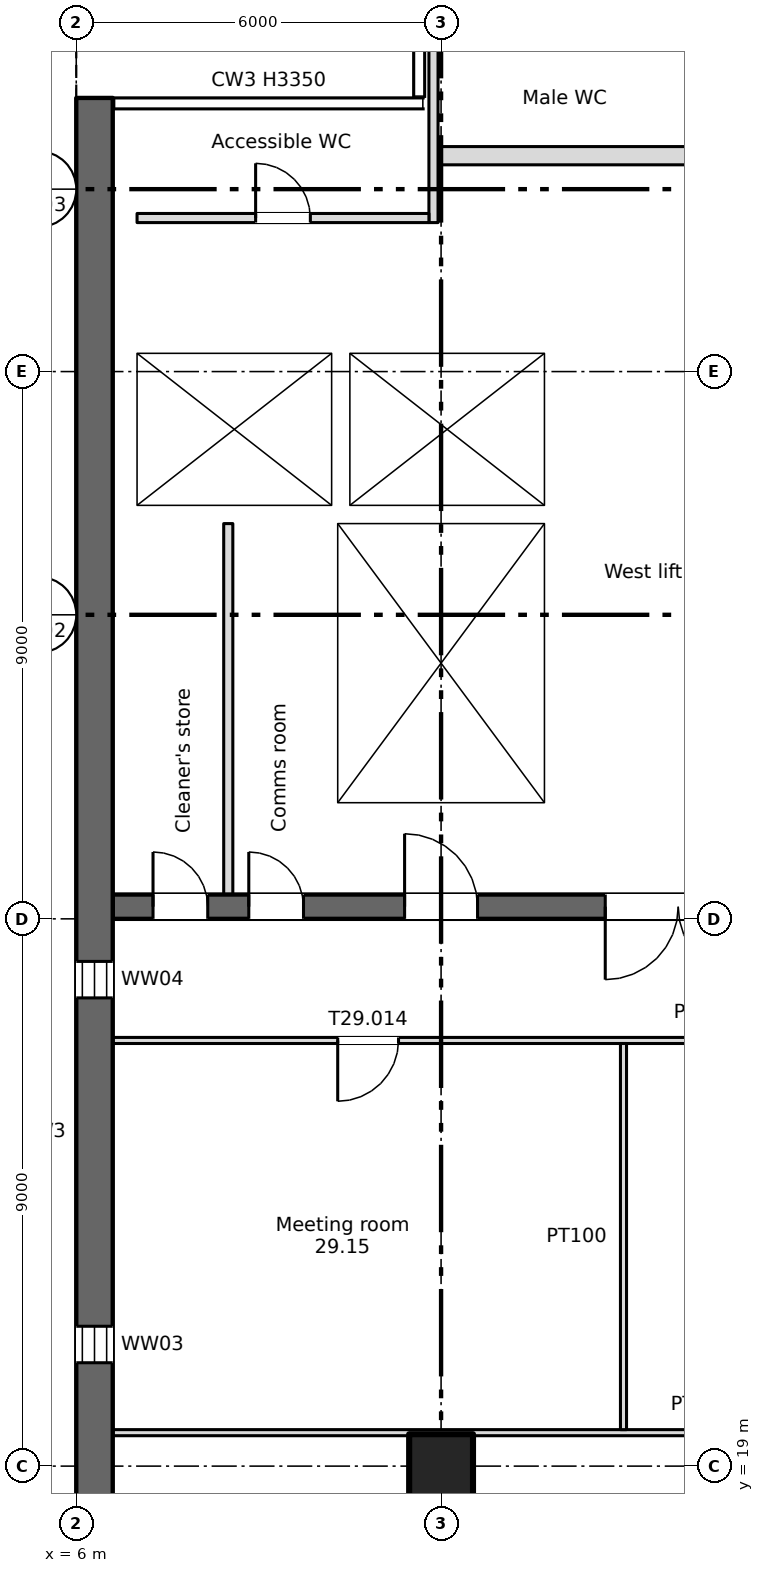
"""IFC4 building model, lengths in metres.
Left out: names, types, materials, properties, quantities, classifications, styles, units other than length and angle.
Written with IfcOpenShell. Run it as: python <this file> out.ifc"""

import sys

from ifc_helpers import new_model, si_unit, direction, frame, frame_2d, origin, origin_2d, place, context, subcontext, project, spatial, rectangle, extrude, element, fill, save


model = new_model("IFC4")
c1 = context("Model", 3, precision=1e-05, world=origin(), true_north=direction((0.0, 1.0)))
c2 = subcontext(c1, "Body", "Model", "MODEL_VIEW")
j1 = project(units=[si_unit("LENGTHUNIT", "METRE"), si_unit("PLANEANGLEUNIT", "RADIAN")], contexts=[c1])
p1 = place(None, origin())
s1 = spatial("IfcSite", under=j1, at=p1, CompositionType="ELEMENT")
p2 = place(p1, origin())
s2 = spatial("IfcBuilding", under=s1, at=p2, CompositionType="ELEMENT")
p3 = place(p2, frame((0.0, 0.0, 204.25)))
s3 = spatial("IfcBuildingStorey", under=s2, at=p3, CompositionType="ELEMENT", Elevation=204.25)
p4 = place(p3, frame((12.0, 19.0, 0.0), z_axis=(0.0, 0.0, 1.0), x_axis=(1.0, 0.0, 0.0)))
e1 = element("IfcColumn", 1, at=p4, inside=s3, PredefinedType="COLUMN", context=c2, shape_type="SweptSolid", body=[
    extrude(rectangle(XDim=1.05, YDim=1.05, at=origin_2d()), origin(), (0.0, 0.0, 1.0), 3.35),
])
p5 = place(p3, frame((6.3, 7.5, 0.0), z_axis=(0.0, 0.0, 1.0), x_axis=(0.0, 1.0, 0.0)))
e2 = element("IfcWall", 2, at=p5, inside=s3, PredefinedType="SHEAR", context=c2, shape_type="SweptSolid", body=[
    extrude(rectangle(XDim=34.0, YDim=0.6, at=frame_2d((17.0, 0.0))), origin(), (0.0, 0.0, 1.0), 3.35),
])
p6 = place(p5, frame((1.2, 0.0, 0.6)))
e3 = element("IfcOpeningElement", 3, at=p6, cuts=e2, PredefinedType="OPENING", context=c2, shape_type="SweptSolid", body=[
    extrude(rectangle(XDim=0.6, YDim=2.4, at=frame_2d((0.3, 1.2))), frame((0.0, 0.31, 0.0), z_axis=(0.0, -1.0, 0.0), x_axis=(1.0, 0.0, 0.0)), (0.0, 0.0, 1.0), 0.62),
])
p7 = place(p5, frame((7.2, 0.0, 0.6)))
e4 = element("IfcOpeningElement", 4, at=p7, cuts=e2, PredefinedType="OPENING", context=c2, shape_type="SweptSolid", body=[
    extrude(rectangle(XDim=0.6, YDim=2.4, at=frame_2d((0.3, 1.2))), frame((0.0, 0.31, 0.0), z_axis=(0.0, -1.0, 0.0), x_axis=(1.0, 0.0, 0.0)), (0.0, 0.0, 1.0), 0.62),
])
p8 = place(p5, frame((13.2, 0.0, 0.6)))
e5 = element("IfcOpeningElement", 5, at=p8, cuts=e2, PredefinedType="OPENING", context=c2, shape_type="SweptSolid", body=[
    extrude(rectangle(XDim=0.6, YDim=2.4, at=frame_2d((0.3, 1.2))), frame((0.0, 0.31, 0.0), z_axis=(0.0, -1.0, 0.0), x_axis=(1.0, 0.0, 0.0)), (0.0, 0.0, 1.0), 0.62),
])
p9 = place(p5, frame((19.2, 0.0, 0.6)))
e6 = element("IfcOpeningElement", 6, at=p9, cuts=e2, PredefinedType="OPENING", context=c2, shape_type="SweptSolid", body=[
    extrude(rectangle(XDim=0.6, YDim=2.4, at=frame_2d((0.3, 1.2))), frame((0.0, 0.31, 0.0), z_axis=(0.0, -1.0, 0.0), x_axis=(1.0, 0.0, 0.0)), (0.0, 0.0, 1.0), 0.62),
])
p10 = place(p3, frame((6.6, 28.2, 0.0), z_axis=(0.0, 0.0, 1.0), x_axis=(1.0, 0.0, 0.0)))
e7 = element("IfcWall", 7, at=p10, inside=s3, PredefinedType="SHEAR", context=c2, shape_type="SweptSolid", body=[
    extrude(rectangle(XDim=57.9, YDim=0.4, at=frame_2d((28.95, 0.0))), origin(), (0.0, 0.0, 1.0), 3.35),
])
p11 = place(p10, frame((12.663, 0.0, 0.0)))
e8 = element("IfcOpeningElement", 8, at=p11, cuts=e7, PredefinedType="OPENING", context=c2, shape_type="SweptSolid", body=[
    extrude(rectangle(XDim=0.9, YDim=2.1, at=frame_2d((0.45, 1.05))), frame((0.0, 0.21, 0.0), z_axis=(0.0, -1.0, 0.0), x_axis=(1.0, 0.0, 0.0)), (0.0, 0.0, 1.0), 0.42),
])
p12 = place(p10, frame((15.238, 0.0, 0.0)))
e9 = element("IfcOpeningElement", 9, at=p12, cuts=e7, PredefinedType="OPENING", context=c2, shape_type="SweptSolid", body=[
    extrude(rectangle(XDim=0.9, YDim=2.1, at=frame_2d((0.45, 1.05))), frame((0.0, 0.21, 0.0), z_axis=(0.0, -1.0, 0.0), x_axis=(1.0, 0.0, 0.0)), (0.0, 0.0, 1.0), 0.42),
])
p13 = place(p10, frame((49.95, 0.0, 0.0)))
e10 = element("IfcOpeningElement", 10, at=p13, cuts=e7, PredefinedType="OPENING", context=c2, shape_type="SweptSolid", body=[
    extrude(rectangle(XDim=0.9, YDim=2.1, at=frame_2d((0.45, 1.05))), frame((0.0, 0.21, 0.0), z_axis=(0.0, -1.0, 0.0), x_axis=(1.0, 0.0, 0.0)), (0.0, 0.0, 1.0), 0.42),
])
p14 = place(p10, frame((0.663, 0.0, 0.0)))
e11 = element("IfcOpeningElement", 11, at=p14, cuts=e7, PredefinedType="OPENING", context=c2, shape_type="SweptSolid", body=[
    extrude(rectangle(XDim=0.9, YDim=2.1, at=frame_2d((0.45, 1.05))), frame((0.0, 0.21, 0.0), z_axis=(0.0, -1.0, 0.0), x_axis=(1.0, 0.0, 0.0)), (0.0, 0.0, 1.0), 0.42),
])
p15 = place(p10, frame((2.238, 0.0, 0.0)))
e12 = element("IfcOpeningElement", 12, at=p15, cuts=e7, PredefinedType="OPENING", context=c2, shape_type="SweptSolid", body=[
    extrude(rectangle(XDim=0.9, YDim=2.1, at=frame_2d((0.45, 1.05))), frame((0.0, 0.21, 0.0), z_axis=(0.0, -1.0, 0.0), x_axis=(1.0, 0.0, 0.0)), (0.0, 0.0, 1.0), 0.42),
])
p16 = place(p10, frame((4.8, 0.0, 0.0)))
e13 = element("IfcOpeningElement", 13, at=p16, cuts=e7, PredefinedType="OPENING", context=c2, shape_type="SweptSolid", body=[
    extrude(rectangle(XDim=1.2, YDim=2.1, at=frame_2d((0.6, 1.05))), frame((0.0, 0.21, 0.0), z_axis=(0.0, -1.0, 0.0), x_axis=(1.0, 0.0, 0.0)), (0.0, 0.0, 1.0), 0.42),
])
p17 = place(p10, frame((31.8, 0.0, 0.0)))
e14 = element("IfcOpeningElement", 14, at=p17, cuts=e7, PredefinedType="OPENING", context=c2, shape_type="SweptSolid", body=[
    extrude(rectangle(XDim=1.2, YDim=2.1, at=frame_2d((0.6, 1.05))), frame((0.0, 0.21, 0.0), z_axis=(0.0, -1.0, 0.0), x_axis=(1.0, 0.0, 0.0)), (0.0, 0.0, 1.0), 0.42),
])
p18 = place(p10, frame((55.3, 0.0, 0.0)))
e15 = element("IfcOpeningElement", 15, at=p18, cuts=e7, PredefinedType="OPENING", context=c2, shape_type="SweptSolid", body=[
    extrude(rectangle(XDim=1.2, YDim=2.1, at=frame_2d((0.6, 1.05))), frame((0.0, 0.21, 0.0), z_axis=(0.0, -1.0, 0.0), x_axis=(1.0, 0.0, 0.0)), (0.0, 0.0, 1.0), 0.42),
])
p19 = place(p10, frame((21.8, 0.0, 0.0)))
e16 = element("IfcOpeningElement", 16, at=p19, cuts=e7, PredefinedType="OPENING", context=c2, shape_type="SweptSolid", body=[
    extrude(rectangle(XDim=1.2, YDim=2.1, at=frame_2d((0.6, 1.05))), frame((0.0, 0.21, 0.0), z_axis=(0.0, -1.0, 0.0), x_axis=(1.0, 0.0, 0.0)), (0.0, 0.0, 1.0), 0.42),
])
p20 = place(p10, frame((41.8, 0.0, 0.0)))
e17 = element("IfcOpeningElement", 17, at=p20, cuts=e7, PredefinedType="OPENING", context=c2, shape_type="SweptSolid", body=[
    extrude(rectangle(XDim=1.2, YDim=2.1, at=frame_2d((0.6, 1.05))), frame((0.0, 0.21, 0.0), z_axis=(0.0, -1.0, 0.0), x_axis=(1.0, 0.0, 0.0)), (0.0, 0.0, 1.0), 0.42),
])
p21 = place(p10, frame((24.95, 0.0, 0.0)))
e18 = element("IfcOpeningElement", 18, at=p21, cuts=e7, PredefinedType="OPENING", context=c2, shape_type="SweptSolid", body=[
    extrude(rectangle(XDim=2.4, YDim=2.1, at=frame_2d((1.2, 1.05))), frame((0.0, 0.21, 0.0), z_axis=(0.0, -1.0, 0.0), x_axis=(1.0, 0.0, 0.0)), (0.0, 0.0, 1.0), 0.42),
])
p22 = place(p10, frame((37.45, 0.0, 0.0)))
e19 = element("IfcOpeningElement", 19, at=p22, cuts=e7, PredefinedType="OPENING", context=c2, shape_type="SweptSolid", body=[
    extrude(rectangle(XDim=2.4, YDim=2.1, at=frame_2d((1.2, 1.05))), frame((0.0, 0.21, 0.0), z_axis=(0.0, -1.0, 0.0), x_axis=(1.0, 0.0, 0.0)), (0.0, 0.0, 1.0), 0.42),
])
p23 = place(p10, frame((8.1, 0.0, 0.0)))
e20 = element("IfcOpeningElement", 20, at=p23, cuts=e7, PredefinedType="OPENING", context=c2, shape_type="SweptSolid", body=[
    extrude(rectangle(XDim=2.4, YDim=2.1, at=frame_2d((1.2, 1.05))), frame((0.0, 0.21, 0.0), z_axis=(0.0, -1.0, 0.0), x_axis=(1.0, 0.0, 0.0)), (0.0, 0.0, 1.0), 0.42),
])
p24 = place(p10, frame((28.95, 0.0, 0.0)))
e21 = element("IfcOpeningElement", 21, at=p24, cuts=e7, PredefinedType="OPENING", context=c2, shape_type="SweptSolid", body=[
    extrude(rectangle(XDim=0.9, YDim=2.1, at=frame_2d((0.45, 1.05))), frame((0.0, 0.21, 0.0), z_axis=(0.0, -1.0, 0.0), x_axis=(1.0, 0.0, 0.0)), (0.0, 0.0, 1.0), 0.42),
])
p25 = place(p10, frame((34.95, 0.0, 0.0)))
e22 = element("IfcOpeningElement", 22, at=p25, cuts=e7, PredefinedType="OPENING", context=c2, shape_type="SweptSolid", body=[
    extrude(rectangle(XDim=0.9, YDim=2.1, at=frame_2d((0.45, 1.05))), frame((0.0, 0.21, 0.0), z_axis=(0.0, -1.0, 0.0), x_axis=(1.0, 0.0, 0.0)), (0.0, 0.0, 1.0), 0.42),
])
p26 = place(p3, frame((6.8, 28.4, 0.0), z_axis=(0.0, 0.0, 1.0), x_axis=(0.0, 1.0, 0.0)))
e23 = element("IfcWall", 23, at=p26, inside=s3, PredefinedType="SHEAR", context=c2, shape_type="SweptSolid", body=[
    extrude(rectangle(XDim=12.85, YDim=0.4, at=frame_2d((6.425, 0.0))), origin(), (0.0, 0.0, 1.0), 3.35),
])
for number, where, z_axis, x_axis in (
    (24, (10.15, 28.4, 0.0), (0.0, 0.0, 1.0), (0.0, 1.0, 0.0)),
    (25, (13.85, 28.4, 0.0), (0.0, 0.0, 1.0), (0.0, 1.0, 0.0)),
):
    element("IfcWall", number, at=place(p3, frame(where, z_axis=z_axis, x_axis=x_axis)), inside=s3, PredefinedType="SHEAR", context=c2, shape_type="SweptSolid", body=[
        extrude(rectangle(XDim=6.1, YDim=0.3, at=frame_2d((3.05, 0.0))), origin(), (0.0, 0.0, 1.0), 3.35),
    ])
for number, where, z_axis, x_axis in (
    (26, (7.0, 34.65, 0.0), (0.0, 0.0, 1.0), (1.0, 0.0, 0.0)),
    (27, (7.0, 37.45, 0.0), (0.0, 0.0, 1.0), (1.0, 0.0, 0.0)),
):
    element("IfcWall", number, at=place(p3, frame(where, z_axis=z_axis, x_axis=x_axis)), inside=s3, PredefinedType="SHEAR", context=c2, shape_type="SweptSolid", body=[
        extrude(rectangle(XDim=7.0, YDim=0.3, at=frame_2d((3.5, 0.0))), origin(), (0.0, 0.0, 1.0), 3.35),
    ])
p27 = place(p3, frame((13.85, 34.8, 0.0), z_axis=(0.0, 0.0, 1.0), x_axis=(0.0, 1.0, 0.0)))
e28 = element("IfcWall", 28, at=p27, inside=s3, PredefinedType="SHEAR", context=c2, shape_type="SweptSolid", body=[
    extrude(rectangle(XDim=2.5, YDim=0.3, at=frame_2d((1.25, 0.0))), origin(), (0.0, 0.0, 1.0), 3.35),
])
p28 = place(p3, frame((11.95, 40.55, 0.0), z_axis=(0.0, 0.0, 1.0), x_axis=(1.0, 0.0, 0.0)))
e29 = element("IfcWall", 29, at=p28, inside=s3, PredefinedType="PARTITIONING", context=c2, shape_type="SweptSolid", body=[
    extrude(rectangle(XDim=4.35, YDim=0.3, at=frame_2d((2.175, 0.0))), origin(), (0.0, 0.0, 1.0), 3.35),
])
p29 = place(p3, frame((10.35, 34.8, 0.0), z_axis=(0.0, 0.0, 1.0), x_axis=(0.0, 1.0, 0.0)))
e30 = element("IfcWall", 30, at=p29, inside=s3, PredefinedType="SHEAR", context=c2, shape_type="SweptSolid", body=[
    extrude(rectangle(XDim=2.5, YDim=0.3, at=frame_2d((1.25, 0.0))), origin(), (0.0, 0.0, 1.0), 3.35),
])
p30 = place(p3, frame((8.5, 28.4, 0.0), z_axis=(0.0, 0.0, 1.0), x_axis=(0.0, 1.0, 0.0)))
e31 = element("IfcWall", 31, at=p30, inside=s3, PredefinedType="PARTITIONING", context=c2, shape_type="SweptSolid", body=[
    extrude(rectangle(XDim=6.1, YDim=0.15, at=frame_2d((3.05, 0.0))), origin(), (0.0, 0.0, 1.0), 3.35),
])
p31 = place(p3, frame((11.875, 39.45, 0.0), z_axis=(0.0, 0.0, 1.0), x_axis=(0.0, 1.0, 0.0)))
e32 = element("IfcWall", 32, at=p31, inside=s3, PredefinedType="PARTITIONING", context=c2, shape_type="SweptSolid", body=[
    extrude(rectangle(XDim=5.85, YDim=0.15, at=frame_2d((2.925, 0.0))), origin(), (0.0, 0.0, 1.0), 3.35),
])
p32 = place(p3, frame((7.0, 39.525, 0.0), z_axis=(0.0, 0.0, 1.0), x_axis=(1.0, 0.0, 0.0)))
e33 = element("IfcWall", 33, at=p32, inside=s3, PredefinedType="PARTITIONING", context=c2, shape_type="SweptSolid", body=[
    extrude(rectangle(XDim=4.8, YDim=0.15, at=frame_2d((2.4, 0.0))), origin(), (0.0, 0.0, 1.0), 3.35),
])
p33 = place(p32, frame((1.95, 0.0, 0.0)))
e34 = element("IfcOpeningElement", 34, at=p33, cuts=e33, PredefinedType="OPENING", context=c2, shape_type="SweptSolid", body=[
    extrude(rectangle(XDim=0.9, YDim=2.1, at=frame_2d((0.45, 1.05))), frame((0.0, 0.085, 0.0), z_axis=(0.0, -1.0, 0.0), x_axis=(1.0, 0.0, 0.0)), (0.0, 0.0, 1.0), 0.17),
])
p34 = place(p3, frame((6.6, 19.55, 0.0), z_axis=(0.0, 0.0, 1.0), x_axis=(1.0, 0.0, 0.0)))
e35 = element("IfcWall", 35, at=p34, inside=s3, PredefinedType="PARTITIONING", context=c2, shape_type="SweptSolid", body=[
    extrude(rectangle(XDim=19.35, YDim=0.1, at=frame_2d((9.675, 0.0))), origin(), (0.0, 0.0, 1.0), 3.35),
])
p35 = place(p3, frame((6.6, 26.0, 0.0), z_axis=(0.0, 0.0, 1.0), x_axis=(1.0, 0.0, 0.0)))
e36 = element("IfcWall", 36, at=p35, inside=s3, PredefinedType="PARTITIONING", context=c2, shape_type="SweptSolid", body=[
    extrude(rectangle(XDim=19.45, YDim=0.1, at=frame_2d((9.725, 0.0))), origin(), (0.0, 0.0, 1.0), 3.35),
])
p36 = place(p35, frame((3.7, 0.0, 0.0)))
e37 = element("IfcOpeningElement", 37, at=p36, cuts=e36, PredefinedType="OPENING", context=c2, shape_type="SweptSolid", body=[
    extrude(rectangle(XDim=1.0, YDim=2.1, at=frame_2d((0.5, 1.05))), frame((0.0, 0.06, 0.0), z_axis=(0.0, -1.0, 0.0), x_axis=(1.0, 0.0, 0.0)), (0.0, 0.0, 1.0), 0.12),
])
p37 = place(p35, frame((13.0, 0.0, 0.0)))
e38 = element("IfcOpeningElement", 38, at=p37, cuts=e36, PredefinedType="OPENING", context=c2, shape_type="SweptSolid", body=[
    extrude(rectangle(XDim=1.8, YDim=2.1, at=frame_2d((0.9, 1.05))), frame((0.0, 0.06, 0.0), z_axis=(0.0, -1.0, 0.0), x_axis=(1.0, 0.0, 0.0)), (0.0, 0.0, 1.0), 0.12),
])
p38 = place(p3, frame((15.0, 19.6, 0.0), z_axis=(0.0, 0.0, 1.0), x_axis=(0.0, 1.0, 0.0)))
e39 = element("IfcWall", 39, at=p38, inside=s3, PredefinedType="PARTITIONING", context=c2, shape_type="SweptSolid", body=[
    extrude(rectangle(XDim=6.35, YDim=0.1, at=frame_2d((3.175, 0.0))), origin(), (0.0, 0.0, 1.0), 3.35),
])
p39 = place(p8, origin())
e40 = element("IfcWindow", 40, at=p39, inside=s3, PartitioningType="SINGLE_PANEL", PredefinedType="WINDOW", context=c2, shape_type="SweptSolid", body=[
    extrude(rectangle(XDim=0.6, YDim=2.4, at=frame_2d((0.3, 1.2))), frame((0.0, 0.03, 0.0), z_axis=(0.0, -1.0, 0.0), x_axis=(1.0, 0.0, 0.0)), (0.0, 0.0, 1.0), 0.06),
])
fill(e5, e40)
p40 = place(p9, origin())
e41 = element("IfcWindow", 41, at=p40, inside=s3, PartitioningType="SINGLE_PANEL", PredefinedType="WINDOW", context=c2, shape_type="SweptSolid", body=[
    extrude(rectangle(XDim=0.6, YDim=2.4, at=frame_2d((0.3, 1.2))), frame((0.0, 0.03, 0.0), z_axis=(0.0, -1.0, 0.0), x_axis=(1.0, 0.0, 0.0)), (0.0, 0.0, 1.0), 0.06),
])
fill(e6, e41)
p41 = place(p14, origin())
e42 = element("IfcDoor", 42, at=p41, inside=s3, OperationType="SINGLE_SWING_LEFT", PredefinedType="DOOR", context=c2, shape_type="SweptSolid", body=[
    extrude(rectangle(XDim=0.9, YDim=2.1, at=frame_2d((0.45, 1.05))), frame((0.0, 0.025, 0.0), z_axis=(0.0, -1.0, 0.0), x_axis=(1.0, 0.0, 0.0)), (0.0, 0.0, 1.0), 0.05),
])
fill(e11, e42)
p42 = place(p15, origin())
e43 = element("IfcDoor", 43, at=p42, inside=s3, OperationType="SINGLE_SWING_LEFT", PredefinedType="DOOR", context=c2, shape_type="SweptSolid", body=[
    extrude(rectangle(XDim=0.9, YDim=2.1, at=frame_2d((0.45, 1.05))), frame((0.0, 0.025, 0.0), z_axis=(0.0, -1.0, 0.0), x_axis=(1.0, 0.0, 0.0)), (0.0, 0.0, 1.0), 0.05),
])
fill(e12, e43)
p43 = place(p33, origin())
e44 = element("IfcDoor", 44, at=p43, inside=s3, OperationType="SINGLE_SWING_LEFT", PredefinedType="DOOR", context=c2, shape_type="SweptSolid", body=[
    extrude(rectangle(XDim=0.9, YDim=2.1, at=frame_2d((0.45, 1.05))), frame((0.0, 0.025, 0.0), z_axis=(0.0, -1.0, 0.0), x_axis=(1.0, 0.0, 0.0)), (0.0, 0.0, 1.0), 0.05),
])
fill(e34, e44)
p44 = place(p16, origin())
e45 = element("IfcDoor", 45, at=p44, inside=s3, OperationType="SINGLE_SWING_LEFT", PredefinedType="DOOR", context=c2, shape_type="SweptSolid", body=[
    extrude(rectangle(XDim=1.2, YDim=2.1, at=frame_2d((0.6, 1.05))), frame((0.0, 0.025, 0.0), z_axis=(0.0, -1.0, 0.0), x_axis=(1.0, 0.0, 0.0)), (0.0, 0.0, 1.0), 0.05),
])
fill(e13, e45)
p45 = place(p23, origin())
e46 = element("IfcDoor", 46, at=p45, inside=s3, OperationType="DOUBLE_DOOR_SINGLE_SWING", PredefinedType="DOOR", context=c2, shape_type="SweptSolid", body=[
    extrude(rectangle(XDim=2.4, YDim=2.1, at=frame_2d((1.2, 1.05))), frame((0.0, 0.025, 0.0), z_axis=(0.0, -1.0, 0.0), x_axis=(1.0, 0.0, 0.0)), (0.0, 0.0, 1.0), 0.05),
])
fill(e20, e46)
p46 = place(p36, origin())
e47 = element("IfcDoor", 47, at=p46, inside=s3, OperationType="SINGLE_SWING_LEFT", PredefinedType="DOOR", context=c2, shape_type="SweptSolid", body=[
    extrude(rectangle(XDim=1.0, YDim=2.1, at=frame_2d((0.5, 1.05))), frame((0.0, 0.025, 0.0), z_axis=(0.0, -1.0, 0.0), x_axis=(1.0, 0.0, 0.0)), (0.0, 0.0, 1.0), 0.05),
])
fill(e37, e47)
save(model, sys.argv[1])
